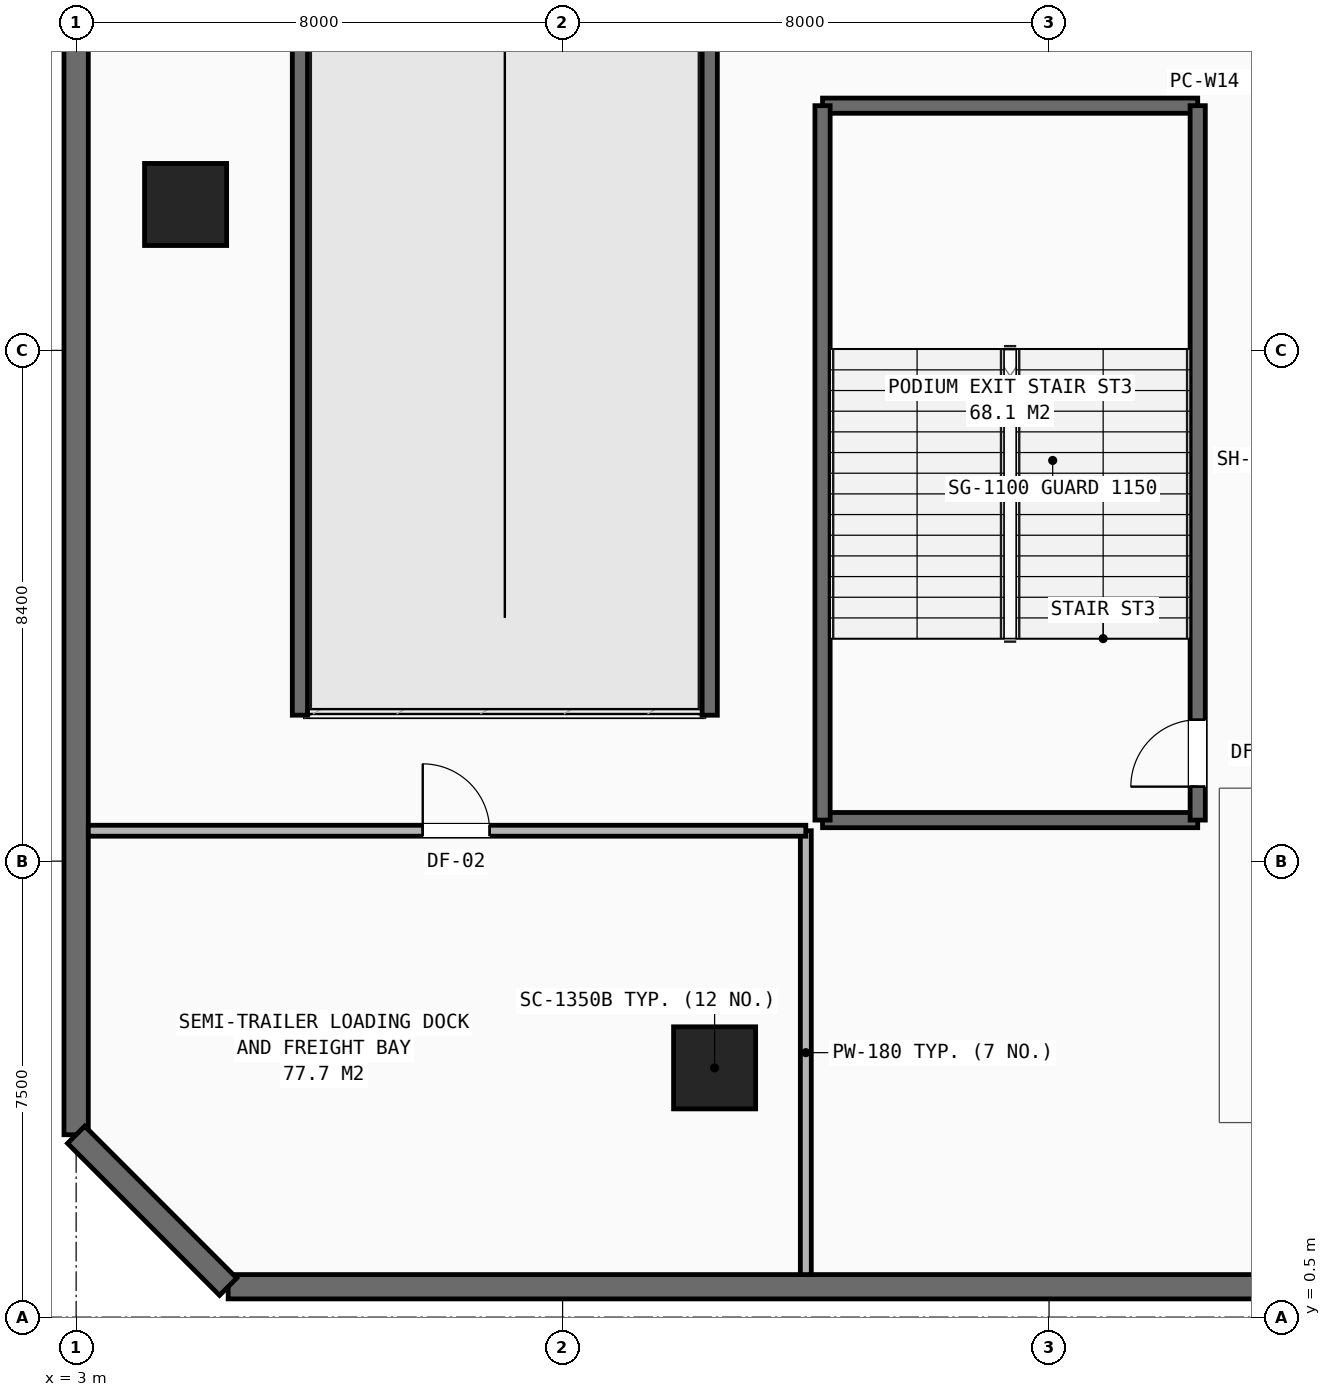
"""IFC4 building model, lengths in metres.
Left out: names, types, materials, properties, quantities, classifications, styles, units other than length and angle.
Written with IfcOpenShell. Run it as: python <this file> out.ifc"""

import sys

from ifc_helpers import new_model, si_unit, direction, frame, frame_2d, origin, origin_2d, place, context, subcontext, project, spatial, rectangle, hollow_rectangle, extrude, element, fill, save


model = new_model("IFC4")
c1 = context("Model", 3, precision=1e-05, world=origin(), true_north=direction((0.0, 1.0)))
c2 = subcontext(c1, "Body", "Model", "MODEL_VIEW")
j1 = project(units=[si_unit("LENGTHUNIT", "METRE"), si_unit("PLANEANGLEUNIT", "RADIAN")], contexts=[c1])
p1 = place(None, origin())
s1 = spatial("IfcSite", under=j1, at=p1, CompositionType="ELEMENT")
p2 = place(p1, origin())
s2 = spatial("IfcBuilding", under=s1, at=p2, CompositionType="ELEMENT")
p3 = place(p2, frame((0.0, 0.0, -5.0)))
s3 = spatial("IfcBuildingStorey", under=s2, at=p3, CompositionType="ELEMENT", Elevation=-5.0)
for number, where, z_axis, x_axis in (
    (1, (13.5, 4.6, 0.0), (0.0, 0.0, 1.0), (1.0, 0.0, 0.0)),
    (2, (4.8, 18.8, 0.0), (0.0, 0.0, 1.0), (1.0, 0.0, 0.0)),
):
    element("IfcColumn", number, at=place(p3, frame(where, z_axis=z_axis, x_axis=x_axis)), inside=s3, PredefinedType="COLUMN", context=c2, shape_type="SweptSolid", body=[
        extrude(hollow_rectangle(XDim=1.35, YDim=1.35, WallThickness=0.085, at=origin_2d()), origin(), (0.0, 0.0, 1.0), 5.0),
    ])
p4 = place(p3, frame((5.5, 1.0, 0.0), z_axis=(0.0, 0.0, 1.0), x_axis=(1.0, 0.0, 0.0)))
e3 = element("IfcWall", 3, at=p4, inside=s3, PredefinedType="USERDEFINED", context=c2, shape_type="SweptSolid", body=[
    extrude(rectangle(XDim=69.0, YDim=0.4, at=frame_2d((34.5, 0.0))), origin(), (0.0, 0.0, 1.0), 4.65),
])
p5 = place(p3, frame((3.0, 51.5, 0.0), z_axis=(0.0, 0.0, 1.0), x_axis=(0.0, -1.0, 0.0)))
e4 = element("IfcWall", 4, at=p5, inside=s3, PredefinedType="USERDEFINED", context=c2, shape_type="SweptSolid", body=[
    extrude(rectangle(XDim=48.0, YDim=0.4, at=frame_2d((24.0, 0.0))), origin(), (0.0, 0.0, 1.0), 4.65),
])
p6 = place(p3, frame((3.0, 3.5, 0.0), z_axis=(0.0, 0.0, 1.0), x_axis=(0.707106781187, -0.707106781187, 0.0)))
e5 = element("IfcWall", 5, at=p6, inside=s3, PredefinedType="USERDEFINED", context=c2, shape_type="SweptSolid", body=[
    extrude(rectangle(XDim=3.536, YDim=0.4, at=frame_2d((1.768, 0.0))), origin(), (0.0, 0.0, 1.0), 4.65),
])
for number, where, z_axis, x_axis in (
    (6, (15.275, 20.425, 0.0), (0.0, 0.0, 1.0), (1.0, 0.0, 0.0)),
    (7, (15.275, 8.675, 0.0), (0.0, 0.0, 1.0), (1.0, 0.0, 0.0)),
):
    element("IfcWall", number, at=place(p3, frame(where, z_axis=z_axis, x_axis=x_axis)), inside=s3, PredefinedType="SHEAR", context=c2, shape_type="SweptSolid", body=[
        extrude(rectangle(XDim=6.17, YDim=0.25, at=frame_2d((3.085, 0.0))), origin(), (0.0, 0.0, 1.0), 4.65),
    ])
p7 = place(p3, frame((15.275, 8.675, 0.0), z_axis=(0.0, 0.0, 1.0), x_axis=(0.0, 1.0, 0.0)))
e8 = element("IfcWall", 8, at=p7, inside=s3, PredefinedType="SHEAR", context=c2, shape_type="SweptSolid", body=[
    extrude(rectangle(XDim=11.75, YDim=0.25, at=frame_2d((5.875, 0.0))), origin(), (0.0, 0.0, 1.0), 4.65),
])
p8 = place(p3, frame((21.445, 8.675, 0.0), z_axis=(0.0, 0.0, 1.0), x_axis=(0.0, 1.0, 0.0)))
e9 = element("IfcWall", 9, at=p8, inside=s3, PredefinedType="SHEAR", context=c2, shape_type="SweptSolid", body=[
    extrude(rectangle(XDim=11.75, YDim=0.25, at=frame_2d((5.875, 0.0))), origin(), (0.0, 0.0, 1.0), 4.65),
])
p9 = place(p8, frame((0.55, 0.0, 0.0)))
e10 = element("IfcOpeningElement", 10, at=p9, cuts=e9, PredefinedType="OPENING", context=c2, shape_type="SweptSolid", body=[
    extrude(rectangle(XDim=1.1, YDim=2.15, at=frame_2d((0.55, 1.075))), frame((0.0, 0.135, 0.0), z_axis=(0.0, -1.0, 0.0), x_axis=(1.0, 0.0, 0.0)), (0.0, 0.0, 1.0), 0.27),
])
for number, where, z_axis, x_axis in (
    (11, (6.68, 10.4, 0.0), (0.0, 0.0, 1.0), (0.0, 1.0, 0.0)),
    (12, (13.42, 10.4, 0.0), (0.0, 0.0, 1.0), (0.0, 1.0, 0.0)),
):
    element("IfcWall", number, at=place(p3, frame(where, z_axis=z_axis, x_axis=x_axis)), inside=s3, PredefinedType="SHEAR", context=c2, shape_type="SweptSolid", body=[
        extrude(rectangle(XDim=40.2, YDim=0.25, at=frame_2d((20.1, 0.0))), origin(), (0.0, 0.0, 1.0), 4.65),
    ])
p10 = place(p3, frame((15.0, 1.2, 0.0), z_axis=(0.0, 0.0, 1.0), x_axis=(0.0, 1.0, 0.0)))
e13 = element("IfcWall", 13, at=p10, inside=s3, PredefinedType="PARTITIONING", context=c2, shape_type="SweptSolid", body=[
    extrude(rectangle(XDim=7.3, YDim=0.18, at=frame_2d((3.65, 0.0))), origin(), (0.0, 0.0, 1.0), 3.861),
])
p11 = place(p3, frame((3.2, 8.5, 0.0), z_axis=(0.0, 0.0, 1.0), x_axis=(1.0, 0.0, 0.0)))
e14 = element("IfcWall", 14, at=p11, inside=s3, PredefinedType="PARTITIONING", context=c2, shape_type="SweptSolid", body=[
    extrude(rectangle(XDim=11.8, YDim=0.18, at=frame_2d((5.9, 0.0))), origin(), (0.0, 0.0, 1.0), 3.861),
])
p12 = place(p11, frame((5.5, 0.0, 0.0)))
e15 = element("IfcOpeningElement", 15, at=p12, cuts=e14, PredefinedType="OPENING", context=c2, shape_type="SweptSolid", body=[
    extrude(rectangle(XDim=1.1, YDim=2.15, at=frame_2d((0.55, 1.075))), frame((0.0, 0.1, 0.0), z_axis=(0.0, -1.0, 0.0), x_axis=(1.0, 0.0, 0.0)), (0.0, 0.0, 1.0), 0.2),
])
p13 = place(p12, origin())
e16 = element("IfcDoor", 16, at=p13, inside=s3, OperationType="SINGLE_SWING_LEFT", PredefinedType="DOOR", context=c2, shape_type="SweptSolid", body=[
    extrude(rectangle(XDim=1.1, YDim=2.15, at=frame_2d((0.55, 1.075))), frame((0.0, 0.025, 0.0), z_axis=(0.0, -1.0, 0.0), x_axis=(1.0, 0.0, 0.0)), (0.0, 0.0, 1.0), 0.05),
])
fill(e15, e16)
p14 = place(p9, origin())
e17 = element("IfcDoor", 17, at=p14, inside=s3, OperationType="SINGLE_SWING_LEFT", PredefinedType="DOOR", context=c2, shape_type="SweptSolid", body=[
    extrude(rectangle(XDim=1.1, YDim=2.15, at=frame_2d((0.55, 1.075))), frame((0.0, 0.025, 0.0), z_axis=(0.0, -1.0, 0.0), x_axis=(1.0, 0.0, 0.0)), (0.0, 0.0, 1.0), 0.05),
])
fill(e10, e17)
save(model, sys.argv[1])
